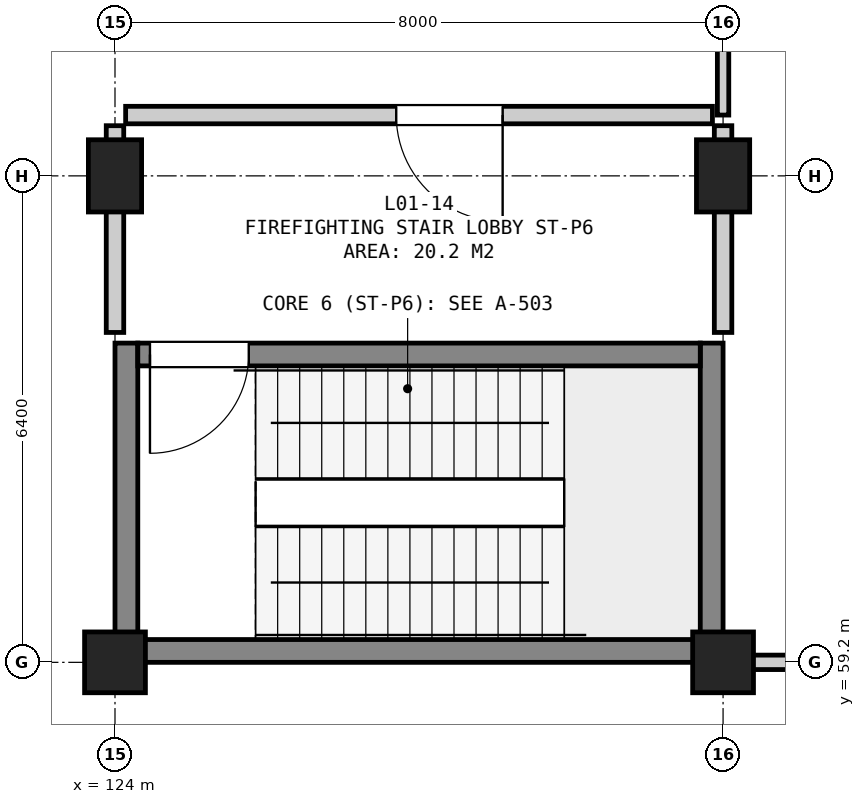
"""IFC4 building model, lengths in metres.
Left out: names, types, materials, properties, quantities, classifications, styles, units other than length and angle.
Written with IfcOpenShell. Run it as: python <this file> out.ifc"""

import sys

from ifc_helpers import new_model, si_unit, direction, frame, frame_2d, origin, origin_2d, place, context, subcontext, project, spatial, rectangle, extrude, element, fill, save


model = new_model("IFC4")
c1 = context("Model", 3, precision=1e-05, world=origin(), true_north=direction((0.0, 1.0)))
c2 = subcontext(c1, "Body", "Model", "MODEL_VIEW")
j1 = project(units=[si_unit("LENGTHUNIT", "METRE"), si_unit("PLANEANGLEUNIT", "RADIAN")], contexts=[c1])
p1 = place(None, origin())
s1 = spatial("IfcSite", under=j1, at=p1, CompositionType="ELEMENT")
p2 = place(p1, origin())
s2 = spatial("IfcBuilding", under=s1, at=p2, CompositionType="ELEMENT")
p3 = place(p2, frame((0.0, 0.0, 5.4)))
s3 = spatial("IfcBuildingStorey", under=s2, at=p3, CompositionType="ELEMENT", Elevation=5.4)
p4 = place(p3, frame((124.0, 59.2, 0.0), z_axis=(0.0, 0.0, 1.0), x_axis=(1.0, 0.0, 0.0)))
e1 = element("IfcColumn", 1, at=p4, inside=s3, PredefinedType="COLUMN", context=c2, shape_type="SweptSolid", body=[
    extrude(rectangle(XDim=0.8, YDim=0.8, at=origin_2d()), origin(), (0.0, 0.0, 1.0), 5.4),
])
p5 = place(p3, frame((124.0, 65.6, 0.0), z_axis=(0.0, 0.0, 1.0), x_axis=(1.0, 0.0, 0.0)))
e2 = element("IfcColumn", 2, at=p5, inside=s3, PredefinedType="COLUMN", context=c2, shape_type="SweptSolid", body=[
    extrude(rectangle(XDim=0.7, YDim=0.95, at=origin_2d()), origin(), (0.0, 0.0, 1.0), 5.4),
])
p6 = place(p3, frame((132.0, 59.2, 0.0), z_axis=(0.0, 0.0, 1.0), x_axis=(1.0, 0.0, 0.0)))
e3 = element("IfcColumn", 3, at=p6, inside=s3, PredefinedType="COLUMN", context=c2, shape_type="SweptSolid", body=[
    extrude(rectangle(XDim=0.8, YDim=0.8, at=origin_2d()), origin(), (0.0, 0.0, 1.0), 5.4),
])
p7 = place(p3, frame((132.0, 65.6, 0.0), z_axis=(0.0, 0.0, 1.0), x_axis=(1.0, 0.0, 0.0)))
e4 = element("IfcColumn", 4, at=p7, inside=s3, PredefinedType="COLUMN", context=c2, shape_type="SweptSolid", body=[
    extrude(rectangle(XDim=0.7, YDim=0.95, at=origin_2d()), origin(), (0.0, 0.0, 1.0), 5.4),
])
for number, where, z_axis, x_axis in (
    (5, (124.15, 59.2, 0.0), (0.0, 0.0, 1.0), (0.0, 1.0, 0.0)),
    (6, (131.85, 59.2, 0.0), (0.0, 0.0, 1.0), (0.0, 1.0, 0.0)),
):
    element("IfcWall", number, at=place(p3, frame(where, z_axis=z_axis, x_axis=x_axis)), inside=s3, PredefinedType="SHEAR", context=c2, shape_type="SweptSolid", body=[
        extrude(rectangle(XDim=4.2, YDim=0.3, at=frame_2d((2.1, 0.0))), origin(), (0.0, 0.0, 1.0), 5.1),
    ])
p8 = place(p3, frame((124.3, 59.35, 0.0), z_axis=(0.0, 0.0, 1.0), x_axis=(1.0, 0.0, 0.0)))
e7 = element("IfcWall", 7, at=p8, inside=s3, PredefinedType="SHEAR", context=c2, shape_type="SweptSolid", body=[
    extrude(rectangle(XDim=7.4, YDim=0.3, at=frame_2d((3.7, 0.0))), origin(), (0.0, 0.0, 1.0), 5.1),
])
p9 = place(p3, frame((124.3, 63.25, 0.0), z_axis=(0.0, 0.0, 1.0), x_axis=(1.0, 0.0, 0.0)))
e8 = element("IfcWall", 8, at=p9, inside=s3, PredefinedType="SHEAR", context=c2, shape_type="SweptSolid", body=[
    extrude(rectangle(XDim=7.4, YDim=0.3, at=frame_2d((3.7, 0.0))), origin(), (0.0, 0.0, 1.0), 5.1),
])
p10 = place(p9, frame((0.16, 0.0, 0.0)))
e9 = element("IfcOpeningElement", 9, at=p10, cuts=e8, PredefinedType="OPENING", context=c2, shape_type="SweptSolid", body=[
    extrude(rectangle(XDim=1.3, YDim=2.18, at=frame_2d((0.65, 1.09))), frame((0.0, 0.162, 0.0), z_axis=(0.0, -1.0, 0.0), x_axis=(1.0, 0.0, 0.0)), (0.0, 0.0, 1.0), 0.324),
])
p11 = place(p3, frame((124.14, 66.4, 0.0), z_axis=(0.0, 0.0, 1.0), x_axis=(1.0, 0.0, 0.0)))
e10 = element("IfcWall", 10, at=p11, inside=s3, PredefinedType="SOLIDWALL", context=c2, shape_type="SweptSolid", body=[
    extrude(rectangle(XDim=7.72, YDim=0.23, at=frame_2d((3.86, 0.0))), origin(), (0.0, 0.0, 1.0), 5.1),
])
p12 = place(p11, frame((3.56, 0.0, 0.0)))
e11 = element("IfcOpeningElement", 11, at=p12, cuts=e10, PredefinedType="OPENING", context=c2, shape_type="SweptSolid", body=[
    extrude(rectangle(XDim=1.4, YDim=2.2, at=frame_2d((0.7, 1.1))), frame((0.0, 0.127, 0.0), z_axis=(0.0, -1.0, 0.0), x_axis=(1.0, 0.0, 0.0)), (0.0, 0.0, 1.0), 0.254),
])
p13 = place(p3, frame((124.0, 63.54, 0.0), z_axis=(0.0, 0.0, 1.0), x_axis=(0.0, 1.0, 0.0)))
e12 = element("IfcWall", 12, at=p13, inside=s3, PredefinedType="SOLIDWALL", context=c2, shape_type="SweptSolid", body=[
    extrude(rectangle(XDim=2.72, YDim=0.23, at=frame_2d((1.36, 0.0))), origin(), (0.0, 0.0, 1.0), 4.335),
])
p14 = place(p3, frame((132.0, 63.54, 0.0), z_axis=(0.0, 0.0, 1.0), x_axis=(0.0, 1.0, 0.0)))
e13 = element("IfcWall", 13, at=p14, inside=s3, PredefinedType="SOLIDWALL", context=c2, shape_type="SweptSolid", body=[
    extrude(rectangle(XDim=2.72, YDim=0.23, at=frame_2d((1.36, 0.0))), origin(), (0.0, 0.0, 1.0), 4.235),
])
p15 = place(p3, frame((132.14, 59.2, 0.0), z_axis=(0.0, 0.0, 1.0), x_axis=(1.0, 0.0, 0.0)))
e14 = element("IfcWall", 14, at=p15, inside=s3, PredefinedType="PARTITIONING", context=c2, shape_type="SweptSolid", body=[
    extrude(rectangle(XDim=16.02, YDim=0.19, at=frame_2d((8.01, 0.0))), origin(), (0.0, 0.0, 1.0), 4.535),
])
p16 = place(p3, frame((132.0, 66.4, 0.0), z_axis=(0.0, 0.0, 1.0), x_axis=(0.0, 1.0, 0.0)))
e15 = element("IfcWall", 15, at=p16, inside=s3, PredefinedType="PARTITIONING", context=c2, shape_type="SweptSolid", body=[
    extrude(rectangle(XDim=9.46, YDim=0.15, at=frame_2d((4.73, 0.0))), origin(), (0.0, 0.0, 1.0), 4.285),
])
p17 = place(p16, frame((2.2, 0.0, 0.0)))
e16 = element("IfcOpeningElement", 16, at=p17, cuts=e15, PredefinedType="OPENING", context=c2, shape_type="SweptSolid", body=[
    extrude(rectangle(XDim=1.2, YDim=2.15, at=frame_2d((0.6, 1.075))), frame((0.0, 0.087, 0.0), z_axis=(0.0, -1.0, 0.0), x_axis=(1.0, 0.0, 0.0)), (0.0, 0.0, 1.0), 0.174),
])
p18 = place(p10, frame((1.3, 0.0, 0.0), z_axis=(0.0, 0.0, 1.0), x_axis=(-1.0, 0.0, 0.0)))
e17 = element("IfcDoor", 17, at=p18, inside=s3, OperationType="SINGLE_SWING_RIGHT", PredefinedType="DOOR", context=c2, shape_type="SweptSolid", body=[
    extrude(rectangle(XDim=1.3, YDim=2.18, at=frame_2d((0.65, 1.09))), frame((0.0, 0.025, 0.0), z_axis=(0.0, -1.0, 0.0), x_axis=(1.0, 0.0, 0.0)), (0.0, 0.0, 1.0), 0.05),
])
fill(e9, e17)
p19 = place(p12, frame((1.4, 0.0, 0.0), z_axis=(0.0, 0.0, 1.0), x_axis=(-1.0, 0.0, 0.0)))
e18 = element("IfcDoor", 18, at=p19, inside=s3, OperationType="SINGLE_SWING_LEFT", PredefinedType="DOOR", context=c2, shape_type="SweptSolid", body=[
    extrude(rectangle(XDim=1.4, YDim=2.2, at=frame_2d((0.7, 1.1))), frame((0.0, 0.025, 0.0), z_axis=(0.0, -1.0, 0.0), x_axis=(1.0, 0.0, 0.0)), (0.0, 0.0, 1.0), 0.05),
])
fill(e11, e18)
save(model, sys.argv[1])
